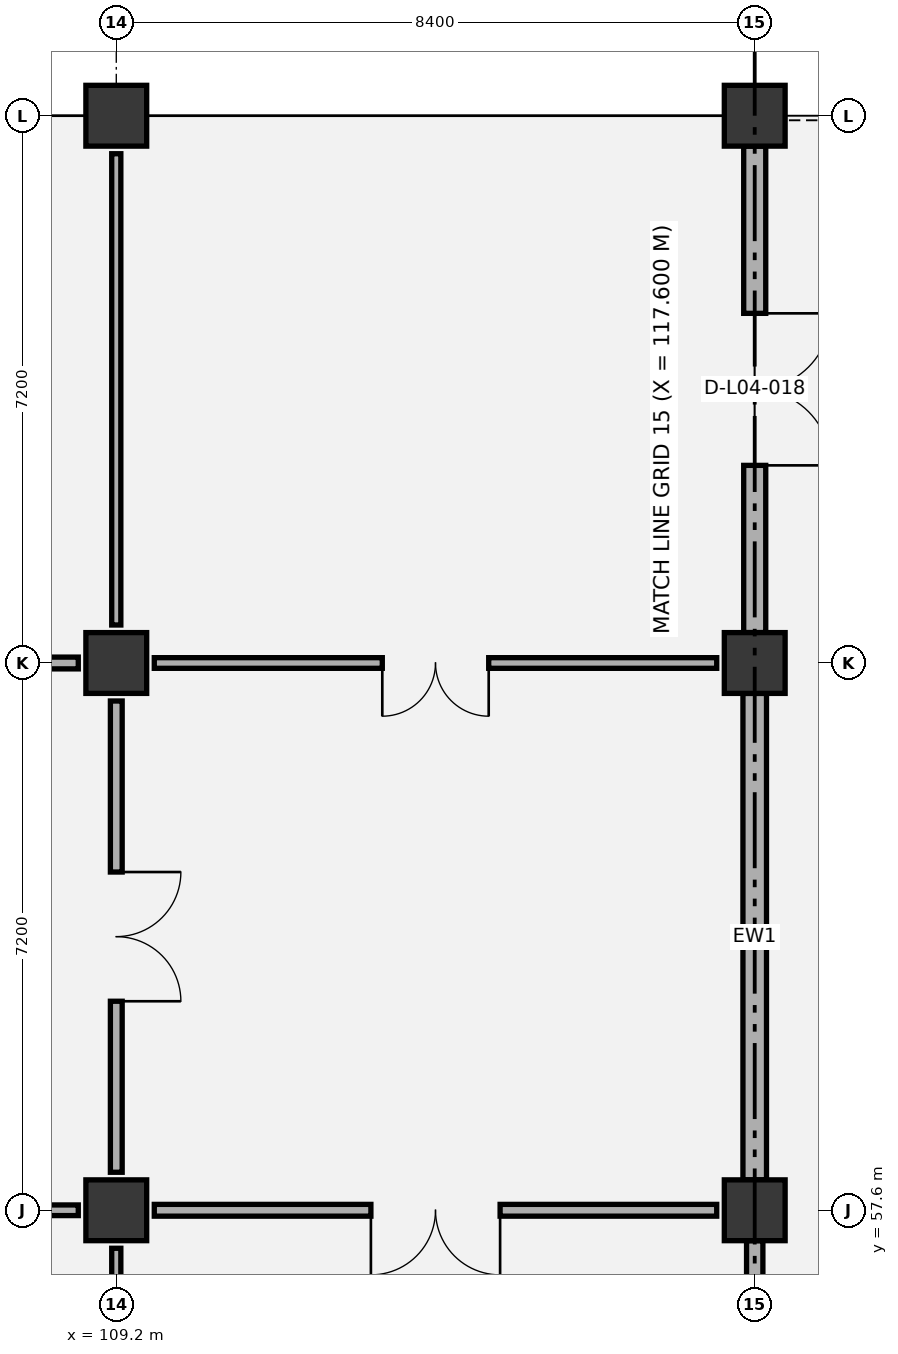
"""IFC4 building model, lengths in metres.
Left out: names, types, materials, properties, quantities, classifications, styles, units other than length and angle.
Written with IfcOpenShell. Run it as: python <this file> out.ifc"""

import sys

from ifc_helpers import new_model, si_unit, direction, frame, frame_2d, origin, origin_2d, place, context, subcontext, project, spatial, rectangle, extrude, element, fill, save


model = new_model("IFC4")
c1 = context("Model", 3, precision=1e-05, world=origin(), true_north=direction((0.0, 1.0)))
c2 = subcontext(c1, "Body", "Model", "MODEL_VIEW")
j1 = project(units=[si_unit("LENGTHUNIT", "METRE"), si_unit("PLANEANGLEUNIT", "RADIAN")], contexts=[c1])
p1 = place(None, origin())
s1 = spatial("IfcSite", under=j1, at=p1, CompositionType="ELEMENT")
p2 = place(p1, origin())
s2 = spatial("IfcBuilding", under=s1, at=p2, CompositionType="ELEMENT")
p3 = place(p2, frame((0.0, 0.0, 22.2)))
s3 = spatial("IfcBuildingStorey", under=s2, at=p3, CompositionType="ELEMENT", Elevation=22.2)
for number, where, z_axis, x_axis in (
    (1, (109.2, 57.6, 0.0), (0.0, 0.0, 1.0), (1.0, 0.0, 0.0)),
    (2, (109.2, 64.8, 0.0), (0.0, 0.0, 1.0), (1.0, 0.0, 0.0)),
    (3, (109.2, 72.0, 0.0), (0.0, 0.0, 1.0), (1.0, 0.0, 0.0)),
    (4, (117.6, 57.6, 0.0), (0.0, 0.0, 1.0), (1.0, 0.0, 0.0)),
    (5, (117.6, 64.8, 0.0), (0.0, 0.0, 1.0), (1.0, 0.0, 0.0)),
    (6, (117.6, 72.0, 0.0), (0.0, 0.0, 1.0), (1.0, 0.0, 0.0)),
):
    element("IfcColumn", number, at=place(p3, frame(where, z_axis=z_axis, x_axis=x_axis)), inside=s3, PredefinedType="COLUMN", context=c2, shape_type="SweptSolid", body=[
        extrude(rectangle(XDim=0.8, YDim=0.8, at=origin_2d()), origin(), (0.0, 0.0, 1.0), 4.8),
    ])
p4 = place(p3, frame((117.6, 50.8, 0.0), z_axis=(0.0, 0.0, 1.0), x_axis=(0.0, 1.0, 0.0)))
e7 = element("IfcWall", 7, at=p4, inside=s3, PredefinedType="SOLIDWALL", context=c2, shape_type="SweptSolid", body=[
    extrude(rectangle(XDim=6.4, YDim=0.215, at=frame_2d((3.2, 0.0))), origin(), (0.0, 0.0, 1.0), 3.865),
])
p5 = place(p4, frame((2.575, 0.0, 0.0)))
e8 = element("IfcOpeningElement", 8, at=p5, cuts=e7, PredefinedType="OPENING", context=c2, shape_type="SweptSolid", body=[
    extrude(rectangle(XDim=1.25, YDim=2.15, at=frame_2d((0.625, 1.075))), frame((0.0, 0.117, 0.0), z_axis=(0.0, -1.0, 0.0), x_axis=(1.0, 0.0, 0.0)), (0.0, 0.0, 1.0), 0.235),
])
p6 = place(p3, frame((117.6, 58.0, 0.0), z_axis=(0.0, 0.0, 1.0), x_axis=(0.0, 1.0, 0.0)))
e9 = element("IfcWall", 9, at=p6, inside=s3, PredefinedType="SOLIDWALL", context=c2, shape_type="SweptSolid", body=[
    extrude(rectangle(XDim=6.4, YDim=0.31, at=frame_2d((3.2, 0.0))), origin(), (0.0, 0.0, 1.0), 3.865),
])
p7 = place(p3, frame((117.6, 65.2, 0.0), z_axis=(0.0, 0.0, 1.0), x_axis=(0.0, 1.0, 0.0)))
e10 = element("IfcWall", 10, at=p7, inside=s3, PredefinedType="SOLIDWALL", context=c2, shape_type="SweptSolid", body=[
    extrude(rectangle(XDim=6.4, YDim=0.29, at=frame_2d((3.2, 0.0))), origin(), (0.0, 0.0, 1.0), 3.865),
])
p8 = place(p7, frame((2.2, 0.0, 0.0)))
e11 = element("IfcOpeningElement", 11, at=p8, cuts=e10, PredefinedType="OPENING", context=c2, shape_type="SweptSolid", body=[
    extrude(rectangle(XDim=2.0, YDim=2.4, at=frame_2d((1.0, 1.2))), frame((0.0, 0.155, 0.0), z_axis=(0.0, -1.0, 0.0), x_axis=(1.0, 0.0, 0.0)), (0.0, 0.0, 1.0), 0.31),
])
p9 = place(p3, frame((117.6, 72.12, -0.35), z_axis=(0.0, 0.0, 1.0), x_axis=(0.0, 1.0, 0.0)))
e12 = element("IfcWall", 12, at=p9, inside=s3, PredefinedType="PARAPET", context=c2, shape_type="SweptSolid", body=[
    extrude(rectangle(XDim=6.96, YDim=0.22, at=frame_2d((3.48, 0.0))), origin(), (0.0, 0.0, 1.0), 1.15),
])
p10 = place(p3, frame((109.2, 50.9, 0.0), z_axis=(0.0, 0.0, 1.0), x_axis=(0.0, 1.0, 0.0)))
e13 = element("IfcWall", 13, at=p10, inside=s3, PredefinedType="PARTITIONING", context=c2, shape_type="SweptSolid", body=[
    extrude(rectangle(XDim=6.2, YDim=0.12, at=frame_2d((3.1, 0.0))), origin(), (0.0, 0.0, 1.0), 4.115),
])
p11 = place(p3, frame((101.3, 57.6, 0.0), z_axis=(0.0, 0.0, 1.0), x_axis=(1.0, 0.0, 0.0)))
e14 = element("IfcWall", 14, at=p11, inside=s3, PredefinedType="PARTITIONING", context=c2, shape_type="SweptSolid", body=[
    extrude(rectangle(XDim=7.4, YDim=0.14, at=frame_2d((3.7, 0.0))), origin(), (0.0, 0.0, 1.0), 3.815),
])
p12 = place(p11, frame((3.0, 0.0, 0.0)))
e15 = element("IfcOpeningElement", 15, at=p12, cuts=e14, PredefinedType="OPENING", context=c2, shape_type="SweptSolid", body=[
    extrude(rectangle(XDim=1.4, YDim=2.15, at=frame_2d((0.7, 1.075))), frame((0.0, 0.08, 0.0), z_axis=(0.0, -1.0, 0.0), x_axis=(1.0, 0.0, 0.0)), (0.0, 0.0, 1.0), 0.16),
])
p13 = place(p3, frame((109.2, 58.1, 0.0), z_axis=(0.0, 0.0, 1.0), x_axis=(0.0, 1.0, 0.0)))
e16 = element("IfcWall", 16, at=p13, inside=s3, PredefinedType="PARTITIONING", context=c2, shape_type="SweptSolid", body=[
    extrude(rectangle(XDim=6.2, YDim=0.155, at=frame_2d((3.1, 0.0))), origin(), (0.0, 0.0, 1.0), 3.865),
])
p14 = place(p13, frame((2.25, 0.0, 0.0)))
e17 = element("IfcOpeningElement", 17, at=p14, cuts=e16, PredefinedType="OPENING", context=c2, shape_type="SweptSolid", body=[
    extrude(rectangle(XDim=1.7, YDim=2.25, at=frame_2d((0.85, 1.125))), frame((0.0, 0.087, 0.0), z_axis=(0.0, -1.0, 0.0), x_axis=(1.0, 0.0, 0.0)), (0.0, 0.0, 1.0), 0.175),
])
p15 = place(p3, frame((101.3, 64.8, 0.0), z_axis=(0.0, 0.0, 1.0), x_axis=(1.0, 0.0, 0.0)))
e18 = element("IfcWall", 18, at=p15, inside=s3, PredefinedType="PARTITIONING", context=c2, shape_type="SweptSolid", body=[
    extrude(rectangle(XDim=7.4, YDim=0.155, at=frame_2d((3.7, 0.0))), origin(), (0.0, 0.0, 1.0), 3.815),
])
p16 = place(p15, frame((3.0, 0.0, 0.0)))
e19 = element("IfcOpeningElement", 19, at=p16, cuts=e18, PredefinedType="OPENING", context=c2, shape_type="SweptSolid", body=[
    extrude(rectangle(XDim=1.4, YDim=2.15, at=frame_2d((0.7, 1.075))), frame((0.0, 0.087, 0.0), z_axis=(0.0, -1.0, 0.0), x_axis=(1.0, 0.0, 0.0)), (0.0, 0.0, 1.0), 0.175),
])
p17 = place(p3, frame((109.2, 65.3, 0.0), z_axis=(0.0, 0.0, 1.0), x_axis=(0.0, 1.0, 0.0)))
e20 = element("IfcWall", 20, at=p17, inside=s3, PredefinedType="PARTITIONING", context=c2, shape_type="SweptSolid", body=[
    extrude(rectangle(XDim=6.2, YDim=0.12, at=frame_2d((3.1, 0.0))), origin(), (0.0, 0.0, 1.0), 4.225),
])
p18 = place(p3, frame((109.7, 57.6, 0.0), z_axis=(0.0, 0.0, 1.0), x_axis=(1.0, 0.0, 0.0)))
e21 = element("IfcWall", 21, at=p18, inside=s3, PredefinedType="PARTITIONING", context=c2, shape_type="SweptSolid", body=[
    extrude(rectangle(XDim=7.4, YDim=0.155, at=frame_2d((3.7, 0.0))), origin(), (0.0, 0.0, 1.0), 3.815),
])
p19 = place(p18, frame((2.85, 0.0, 0.0)))
e22 = element("IfcOpeningElement", 22, at=p19, cuts=e21, PredefinedType="OPENING", context=c2, shape_type="SweptSolid", body=[
    extrude(rectangle(XDim=1.7, YDim=2.25, at=frame_2d((0.85, 1.125))), frame((0.0, 0.087, 0.0), z_axis=(0.0, -1.0, 0.0), x_axis=(1.0, 0.0, 0.0)), (0.0, 0.0, 1.0), 0.175),
])
p20 = place(p3, frame((109.7, 64.8, 0.0), z_axis=(0.0, 0.0, 1.0), x_axis=(1.0, 0.0, 0.0)))
e23 = element("IfcWall", 23, at=p20, inside=s3, PredefinedType="PARTITIONING", context=c2, shape_type="SweptSolid", body=[
    extrude(rectangle(XDim=7.4, YDim=0.14, at=frame_2d((3.7, 0.0))), origin(), (0.0, 0.0, 1.0), 3.815),
])
p21 = place(p20, frame((3.0, 0.0, 0.0)))
e24 = element("IfcOpeningElement", 24, at=p21, cuts=e23, PredefinedType="OPENING", context=c2, shape_type="SweptSolid", body=[
    extrude(rectangle(XDim=1.4, YDim=2.15, at=frame_2d((0.7, 1.075))), frame((0.0, 0.08, 0.0), z_axis=(0.0, -1.0, 0.0), x_axis=(1.0, 0.0, 0.0)), (0.0, 0.0, 1.0), 0.16),
])
p22 = place(p8, frame((2.0, 0.0, 0.0), z_axis=(0.0, 0.0, 1.0), x_axis=(-1.0, 0.0, 0.0)))
e25 = element("IfcDoor", 25, at=p22, inside=s3, OperationType="DOUBLE_DOOR_SINGLE_SWING", PredefinedType="DOOR", context=c2, shape_type="SweptSolid", body=[
    extrude(rectangle(XDim=2.0, YDim=2.4, at=frame_2d((1.0, 1.2))), frame((0.0, 0.025, 0.0), z_axis=(0.0, -1.0, 0.0), x_axis=(1.0, 0.0, 0.0)), (0.0, 0.0, 1.0), 0.05),
])
fill(e11, e25)
p23 = place(p14, frame((1.7, 0.0, 0.0), z_axis=(0.0, 0.0, 1.0), x_axis=(-1.0, 0.0, 0.0)))
e26 = element("IfcDoor", 26, at=p23, inside=s3, OperationType="DOUBLE_DOOR_SINGLE_SWING", PredefinedType="DOOR", context=c2, shape_type="SweptSolid", body=[
    extrude(rectangle(XDim=1.7, YDim=2.25, at=frame_2d((0.85, 1.125))), frame((0.0, 0.025, 0.0), z_axis=(0.0, -1.0, 0.0), x_axis=(1.0, 0.0, 0.0)), (0.0, 0.0, 1.0), 0.05),
])
fill(e17, e26)
p24 = place(p19, frame((1.7, 0.0, 0.0), z_axis=(0.0, 0.0, 1.0), x_axis=(-1.0, 0.0, 0.0)))
e27 = element("IfcDoor", 27, at=p24, inside=s3, OperationType="DOUBLE_DOOR_SINGLE_SWING", PredefinedType="DOOR", context=c2, shape_type="SweptSolid", body=[
    extrude(rectangle(XDim=1.7, YDim=2.25, at=frame_2d((0.85, 1.125))), frame((0.0, 0.025, 0.0), z_axis=(0.0, -1.0, 0.0), x_axis=(1.0, 0.0, 0.0)), (0.0, 0.0, 1.0), 0.05),
])
fill(e22, e27)
p25 = place(p21, frame((1.4, 0.0, 0.0), z_axis=(0.0, 0.0, 1.0), x_axis=(-1.0, 0.0, 0.0)))
e28 = element("IfcDoor", 28, at=p25, inside=s3, OperationType="DOUBLE_DOOR_SINGLE_SWING", PredefinedType="DOOR", context=c2, shape_type="SweptSolid", body=[
    extrude(rectangle(XDim=1.4, YDim=2.15, at=frame_2d((0.7, 1.075))), frame((0.0, 0.025, 0.0), z_axis=(0.0, -1.0, 0.0), x_axis=(1.0, 0.0, 0.0)), (0.0, 0.0, 1.0), 0.05),
])
fill(e24, e28)
save(model, sys.argv[1])
